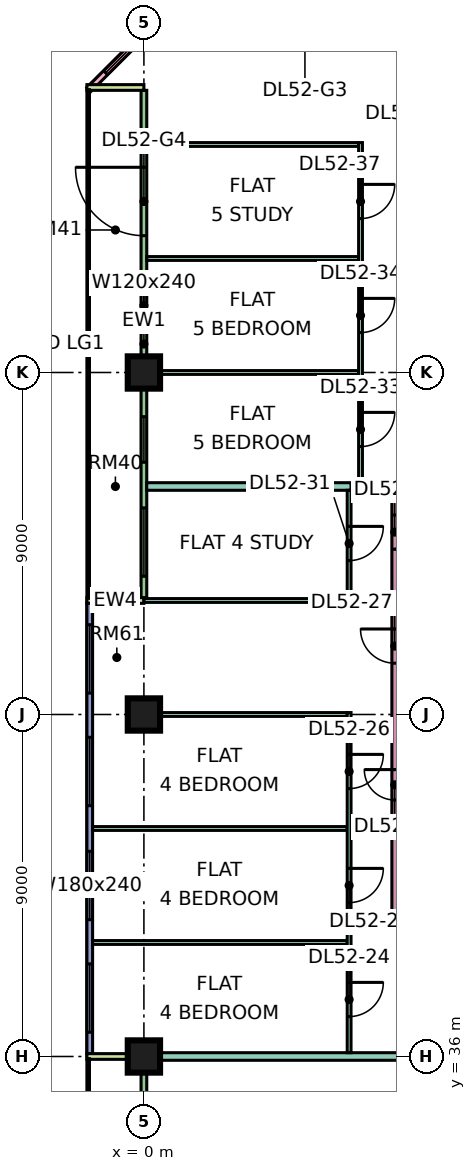
"""IFC4 building model, lengths in metres.
Left out: names, types, materials, properties, quantities, classifications, styles, units other than length and angle.
Written with IfcOpenShell. Run it as: python <this file> out.ifc"""

import sys

from ifc_helpers import new_model, si_unit, direction, frame, frame_2d, origin, origin_2d, place, context, subcontext, project, spatial, rectangle, extrude, element, fill, save


model = new_model("IFC4")
c1 = context("Model", 3, precision=1e-05, world=origin(), true_north=direction((0.0, 1.0)))
c2 = subcontext(c1, "Body", "Model", "MODEL_VIEW")
j1 = project(units=[si_unit("LENGTHUNIT", "METRE"), si_unit("PLANEANGLEUNIT", "RADIAN")], contexts=[c1])
p1 = place(None, origin())
s1 = spatial("IfcSite", under=j1, at=p1, CompositionType="ELEMENT")
p2 = place(p1, origin())
s2 = spatial("IfcBuilding", under=s1, at=p2, CompositionType="ELEMENT")
p3 = place(p2, frame((0.0, 0.0, 222.9)))
s3 = spatial("IfcBuildingStorey", under=s2, at=p3, CompositionType="ELEMENT", Elevation=222.9)
p4 = place(p3, frame((0.0, 36.0, 0.0), z_axis=(0.0, 0.0, 1.0), x_axis=(1.0, 0.0, 0.0)))
e1 = element("IfcColumn", 1, at=p4, inside=s3, PredefinedType="COLUMN", context=c2, shape_type="SweptSolid", body=[
    extrude(rectangle(XDim=0.85, YDim=0.85, at=origin_2d()), origin(), (0.0, 0.0, 1.0), 3.75),
])
p5 = place(p3, frame((0.0, 45.0, 0.0), z_axis=(0.0, 0.0, 1.0), x_axis=(1.0, 0.0, 0.0)))
e2 = element("IfcColumn", 2, at=p5, inside=s3, PredefinedType="COLUMN", context=c2, shape_type="SweptSolid", body=[
    extrude(rectangle(XDim=0.85, YDim=0.85, at=origin_2d()), origin(), (0.0, 0.0, 1.0), 3.75),
])
p6 = place(p3, frame((0.0, 54.0, 0.0), z_axis=(0.0, 0.0, 1.0), x_axis=(1.0, 0.0, 0.0)))
e3 = element("IfcColumn", 3, at=p6, inside=s3, PredefinedType="COLUMN", context=c2, shape_type="SweptSolid", body=[
    extrude(rectangle(XDim=0.85, YDim=0.85, at=origin_2d()), origin(), (0.0, 0.0, 1.0), 3.75),
])
p7 = place(p3, frame((1.553, 64.447, 0.0), z_axis=(0.0, 0.0, 1.0), x_axis=(-0.707106781187, -0.707106781187, 0.0)))
e4 = element("IfcWall", 4, at=p7, inside=s3, PredefinedType="SOLIDWALL", context=c2, shape_type="SweptSolid", body=[
    extrude(rectangle(XDim=4.243, YDim=0.15, at=frame_2d((2.121, 0.0))), origin(), (0.0, 0.0, 1.0), 3.35),
])
p8 = place(p7, frame((0.621, 0.0, 0.45)))
e5 = element("IfcOpeningElement", 5, at=p8, cuts=e4, PredefinedType="OPENING", context=c2, shape_type="SweptSolid", body=[
    extrude(rectangle(XDim=3.0, YDim=2.4, at=frame_2d((1.5, 1.2))), frame((0.0, 0.085, 0.0), z_axis=(0.0, -1.0, 0.0), x_axis=(1.0, 0.0, 0.0)), (0.0, 0.0, 1.0), 0.17),
])
p9 = place(p3, frame((0.0, 61.425, 0.0), z_axis=(0.0, 0.0, 1.0), x_axis=(0.0, -1.0, 0.0)))
e6 = element("IfcWall", 6, at=p9, inside=s3, PredefinedType="SOLIDWALL", context=c2, shape_type="SweptSolid", body=[
    extrude(rectangle(XDim=13.35, YDim=0.15, at=frame_2d((6.675, 0.0))), origin(), (0.0, 0.0, 1.0), 3.35),
])
p10 = place(p9, frame((2.025, 0.0, 0.0)))
e7 = element("IfcOpeningElement", 7, at=p10, cuts=e6, PredefinedType="OPENING", context=c2, shape_type="SweptSolid", body=[
    extrude(rectangle(XDim=1.8, YDim=2.4, at=frame_2d((0.9, 1.2))), frame((0.0, 0.085, 0.0), z_axis=(0.0, -1.0, 0.0), x_axis=(1.0, 0.0, 0.0)), (0.0, 0.0, 1.0), 0.17),
])
p11 = place(p9, frame((5.062, 0.0, 0.45)))
e8 = element("IfcOpeningElement", 8, at=p11, cuts=e6, PredefinedType="OPENING", context=c2, shape_type="SweptSolid", body=[
    extrude(rectangle(XDim=1.2, YDim=2.4, at=frame_2d((0.6, 1.2))), frame((0.0, 0.085, 0.0), z_axis=(0.0, -1.0, 0.0), x_axis=(1.0, 0.0, 0.0)), (0.0, 0.0, 1.0), 0.17),
])
p12 = place(p9, frame((8.587, 0.0, 0.45)))
e9 = element("IfcOpeningElement", 9, at=p12, cuts=e6, PredefinedType="OPENING", context=c2, shape_type="SweptSolid", body=[
    extrude(rectangle(XDim=1.2, YDim=2.4, at=frame_2d((0.6, 1.2))), frame((0.0, 0.085, 0.0), z_axis=(0.0, -1.0, 0.0), x_axis=(1.0, 0.0, 0.0)), (0.0, 0.0, 1.0), 0.17),
])
p13 = place(p9, frame((10.988, 0.0, 0.45)))
e10 = element("IfcOpeningElement", 10, at=p13, cuts=e6, PredefinedType="OPENING", context=c2, shape_type="SweptSolid", body=[
    extrude(rectangle(XDim=1.8, YDim=2.4, at=frame_2d((0.9, 1.2))), frame((0.0, 0.085, 0.0), z_axis=(0.0, -1.0, 0.0), x_axis=(1.0, 0.0, 0.0)), (0.0, 0.0, 1.0), 0.17),
])
for number, where, z_axis, x_axis in (
    (11, (-1.5, 61.5, 0.0), (0.0, 0.0, 1.0), (1.0, 0.0, 0.0)),
    (12, (-1.5, 48.0, 0.0), (0.0, 0.0, 1.0), (1.0, 0.0, 0.0)),
):
    element("IfcWall", number, at=place(p3, frame(where, z_axis=z_axis, x_axis=x_axis)), inside=s3, PredefinedType="SOLIDWALL", context=c2, shape_type="SweptSolid", body=[
        extrude(rectangle(XDim=1.5, YDim=0.15, at=frame_2d((0.75, 0.0))), origin(), (0.0, 0.0, 1.0), 3.35),
    ])
p14 = place(p3, frame((-1.425, 47.925, 0.0), z_axis=(0.0, 0.0, 1.0), x_axis=(0.0, -1.0, 0.0)))
e13 = element("IfcWall", 13, at=p14, inside=s3, PredefinedType="SOLIDWALL", context=c2, shape_type="SweptSolid", body=[
    extrude(rectangle(XDim=11.85, YDim=0.15, at=frame_2d((5.925, 0.0))), origin(), (0.0, 0.0, 1.0), 3.35),
])
p15 = place(p14, frame((0.562, 0.0, 0.45)))
e14 = element("IfcOpeningElement", 14, at=p15, cuts=e13, PredefinedType="OPENING", context=c2, shape_type="SweptSolid", body=[
    extrude(rectangle(XDim=1.8, YDim=2.4, at=frame_2d((0.9, 1.2))), frame((0.0, 0.085, 0.0), z_axis=(0.0, -1.0, 0.0), x_axis=(1.0, 0.0, 0.0)), (0.0, 0.0, 1.0), 0.17),
])
p16 = place(p14, frame((3.525, 0.0, 0.45)))
e15 = element("IfcOpeningElement", 15, at=p16, cuts=e13, PredefinedType="OPENING", context=c2, shape_type="SweptSolid", body=[
    extrude(rectangle(XDim=1.8, YDim=2.4, at=frame_2d((0.9, 1.2))), frame((0.0, 0.085, 0.0), z_axis=(0.0, -1.0, 0.0), x_axis=(1.0, 0.0, 0.0)), (0.0, 0.0, 1.0), 0.17),
])
p17 = place(p14, frame((6.525, 0.0, 0.45)))
e16 = element("IfcOpeningElement", 16, at=p17, cuts=e13, PredefinedType="OPENING", context=c2, shape_type="SweptSolid", body=[
    extrude(rectangle(XDim=1.8, YDim=2.4, at=frame_2d((0.9, 1.2))), frame((0.0, 0.085, 0.0), z_axis=(0.0, -1.0, 0.0), x_axis=(1.0, 0.0, 0.0)), (0.0, 0.0, 1.0), 0.17),
])
p18 = place(p14, frame((9.488, 0.0, 0.45)))
e17 = element("IfcOpeningElement", 17, at=p18, cuts=e13, PredefinedType="OPENING", context=c2, shape_type="SweptSolid", body=[
    extrude(rectangle(XDim=1.8, YDim=2.4, at=frame_2d((0.9, 1.2))), frame((0.0, 0.085, 0.0), z_axis=(0.0, -1.0, 0.0), x_axis=(1.0, 0.0, 0.0)), (0.0, 0.0, 1.0), 0.17),
])
p19 = place(p3, frame((0.0, 35.925, 0.0), z_axis=(0.0, 0.0, 1.0), x_axis=(0.0, -1.0, 0.0)))
e18 = element("IfcWall", 18, at=p19, inside=s3, PredefinedType="SOLIDWALL", context=c2, shape_type="SweptSolid", body=[
    extrude(rectangle(XDim=11.85, YDim=0.15, at=frame_2d((5.925, 0.0))), origin(), (0.0, 0.0, 1.0), 3.35),
])
p20 = place(p19, frame((2.288, 0.0, 0.0)))
e19 = element("IfcOpeningElement", 19, at=p20, cuts=e18, PredefinedType="OPENING", context=c2, shape_type="SweptSolid", body=[
    extrude(rectangle(XDim=1.8, YDim=2.4, at=frame_2d((0.9, 1.2))), frame((0.0, 0.085, 0.0), z_axis=(0.0, -1.0, 0.0), x_axis=(1.0, 0.0, 0.0)), (0.0, 0.0, 1.0), 0.17),
])
p21 = place(p19, frame((6.525, 0.0, 0.45)))
e20 = element("IfcOpeningElement", 20, at=p21, cuts=e18, PredefinedType="OPENING", context=c2, shape_type="SweptSolid", body=[
    extrude(rectangle(XDim=1.8, YDim=2.4, at=frame_2d((0.9, 1.2))), frame((0.0, 0.085, 0.0), z_axis=(0.0, -1.0, 0.0), x_axis=(1.0, 0.0, 0.0)), (0.0, 0.0, 1.0), 0.17),
])
p22 = place(p19, frame((9.562, 0.0, 0.45)))
e21 = element("IfcOpeningElement", 21, at=p22, cuts=e18, PredefinedType="OPENING", context=c2, shape_type="SweptSolid", body=[
    extrude(rectangle(XDim=1.2, YDim=2.4, at=frame_2d((0.6, 1.2))), frame((0.0, 0.085, 0.0), z_axis=(0.0, -1.0, 0.0), x_axis=(1.0, 0.0, 0.0)), (0.0, 0.0, 1.0), 0.17),
])
p23 = place(p3, frame((-1.5, 36.0, 0.0), z_axis=(0.0, 0.0, 1.0), x_axis=(1.0, 0.0, 0.0)))
e22 = element("IfcWall", 22, at=p23, inside=s3, PredefinedType="SOLIDWALL", context=c2, shape_type="SweptSolid", body=[
    extrude(rectangle(XDim=1.5, YDim=0.15, at=frame_2d((0.75, 0.0))), origin(), (0.0, 0.0, 1.0), 3.35),
])
for number, where, z_axis, x_axis in (
    (23, (-1.351, 39.0, 0.0), (0.0, 0.0, 1.0), (1.0, 0.0, 0.0)),
    (24, (-1.351, 42.0, 0.0), (0.0, 0.0, 1.0), (1.0, 0.0, 0.0)),
):
    element("IfcWall", number, at=place(p3, frame(where, z_axis=z_axis, x_axis=x_axis)), inside=s3, PredefinedType="PARTITIONING", context=c2, shape_type="SweptSolid", body=[
        extrude(rectangle(XDim=6.701, YDim=0.1, at=frame_2d((3.351, 0.0))), origin(), (0.0, 0.0, 1.0), 3.35),
    ])
e25 = element("IfcWall", 25, at=p4, inside=s3, PredefinedType="PARTITIONING", context=c2, shape_type="SweptSolid", body=[
    extrude(rectangle(XDim=9.5, YDim=0.2, at=frame_2d((4.75, 0.0))), origin(), (0.0, 0.0, 1.0), 3.35),
])
e26 = element("IfcWall", 26, at=p5, inside=s3, PredefinedType="PARTITIONING", context=c2, shape_type="SweptSolid", body=[
    extrude(rectangle(XDim=5.35, YDim=0.1, at=frame_2d((2.675, 0.0))), origin(), (0.0, 0.0, 1.0), 3.35),
])
p24 = place(p3, frame((0.0, 48.0, 0.0), z_axis=(0.0, 0.0, 1.0), x_axis=(1.0, 0.0, 0.0)))
e27 = element("IfcWall", 27, at=p24, inside=s3, PredefinedType="PARTITIONING", context=c2, shape_type="SweptSolid", body=[
    extrude(rectangle(XDim=5.45, YDim=0.1, at=frame_2d((2.725, 0.0))), origin(), (0.0, 0.0, 1.0), 3.35),
])
p25 = place(p3, frame((0.074, 51.0, 0.0), z_axis=(0.0, 0.0, 1.0), x_axis=(1.0, 0.0, 0.0)))
e28 = element("IfcWall", 28, at=p25, inside=s3, PredefinedType="PARTITIONING", context=c2, shape_type="SweptSolid", body=[
    extrude(rectangle(XDim=5.376, YDim=0.2, at=frame_2d((2.688, 0.0))), origin(), (0.0, 0.0, 1.0), 3.35),
])
for number, where, z_axis, x_axis in (
    (29, (0.074, 54.0, 0.0), (0.0, 0.0, 1.0), (1.0, 0.0, 0.0)),
    (30, (0.074, 57.0, 0.0), (0.0, 0.0, 1.0), (1.0, 0.0, 0.0)),
    (31, (0.074, 60.0, 0.0), (0.0, 0.0, 1.0), (1.0, 0.0, 0.0)),
):
    element("IfcWall", number, at=place(p3, frame(where, z_axis=z_axis, x_axis=x_axis)), inside=s3, PredefinedType="PARTITIONING", context=c2, shape_type="SweptSolid", body=[
        extrude(rectangle(XDim=5.576, YDim=0.1, at=frame_2d((2.788, 0.0))), origin(), (0.0, 0.0, 1.0), 3.35),
    ])
p26 = place(p3, frame((5.4, 36.1, 0.0), z_axis=(0.0, 0.0, 1.0), x_axis=(0.0, 1.0, 0.0)))
e32 = element("IfcWall", 32, at=p26, inside=s3, PredefinedType="PARTITIONING", context=c2, shape_type="SweptSolid", body=[
    extrude(rectangle(XDim=8.95, YDim=0.1, at=frame_2d((4.475, 0.0))), origin(), (0.0, 0.0, 1.0), 3.35),
])
p27 = place(p26, frame((0.95, 0.0, 0.0)))
e33 = element("IfcOpeningElement", 33, at=p27, cuts=e32, PredefinedType="OPENING", context=c2, shape_type="SweptSolid", body=[
    extrude(rectangle(XDim=0.9, YDim=2.1, at=frame_2d((0.45, 1.05))), frame((0.0, 0.06, 0.0), z_axis=(0.0, -1.0, 0.0), x_axis=(1.0, 0.0, 0.0)), (0.0, 0.0, 1.0), 0.12),
])
p28 = place(p26, frame((3.95, 0.0, 0.0)))
e34 = element("IfcOpeningElement", 34, at=p28, cuts=e32, PredefinedType="OPENING", context=c2, shape_type="SweptSolid", body=[
    extrude(rectangle(XDim=0.9, YDim=2.1, at=frame_2d((0.45, 1.05))), frame((0.0, 0.06, 0.0), z_axis=(0.0, -1.0, 0.0), x_axis=(1.0, 0.0, 0.0)), (0.0, 0.0, 1.0), 0.12),
])
p29 = place(p26, frame((6.95, 0.0, 0.0)))
e35 = element("IfcOpeningElement", 35, at=p29, cuts=e32, PredefinedType="OPENING", context=c2, shape_type="SweptSolid", body=[
    extrude(rectangle(XDim=0.9, YDim=2.1, at=frame_2d((0.45, 1.05))), frame((0.0, 0.06, 0.0), z_axis=(0.0, -1.0, 0.0), x_axis=(1.0, 0.0, 0.0)), (0.0, 0.0, 1.0), 0.12),
])
p30 = place(p3, frame((5.4, 48.05, 0.0), z_axis=(0.0, 0.0, 1.0), x_axis=(0.0, 1.0, 0.0)))
e36 = element("IfcWall", 36, at=p30, inside=s3, PredefinedType="PARTITIONING", context=c2, shape_type="SweptSolid", body=[
    extrude(rectangle(XDim=2.85, YDim=0.1, at=frame_2d((1.425, 0.0))), origin(), (0.0, 0.0, 1.0), 3.35),
])
p31 = place(p30, frame((1.0, 0.0, 0.0)))
e37 = element("IfcOpeningElement", 37, at=p31, cuts=e36, PredefinedType="OPENING", context=c2, shape_type="SweptSolid", body=[
    extrude(rectangle(XDim=0.9, YDim=2.1, at=frame_2d((0.45, 1.05))), frame((0.0, 0.06, 0.0), z_axis=(0.0, -1.0, 0.0), x_axis=(1.0, 0.0, 0.0)), (0.0, 0.0, 1.0), 0.12),
])
p32 = place(p3, frame((5.65, 51.0, 0.0), z_axis=(0.0, 0.0, 1.0), x_axis=(1.0, 0.0, 0.0)))
e38 = element("IfcWall", 38, at=p32, inside=s3, PredefinedType="PARTITIONING", context=c2, shape_type="SweptSolid", body=[
    extrude(rectangle(XDim=3.85, YDim=0.2, at=frame_2d((1.925, 0.0))), origin(), (0.0, 0.0, 1.0), 3.35),
])
p33 = place(p3, frame((5.7, 51.1, 0.0), z_axis=(0.0, 0.0, 1.0), x_axis=(0.0, 1.0, 0.0)))
e39 = element("IfcWall", 39, at=p33, inside=s3, PredefinedType="PARTITIONING", context=c2, shape_type="SweptSolid", body=[
    extrude(rectangle(XDim=8.95, YDim=0.1, at=frame_2d((4.475, 0.0))), origin(), (0.0, 0.0, 1.0), 3.35),
])
p34 = place(p33, frame((0.95, 0.0, 0.0)))
e40 = element("IfcOpeningElement", 40, at=p34, cuts=e39, PredefinedType="OPENING", context=c2, shape_type="SweptSolid", body=[
    extrude(rectangle(XDim=0.9, YDim=2.1, at=frame_2d((0.45, 1.05))), frame((0.0, 0.06, 0.0), z_axis=(0.0, -1.0, 0.0), x_axis=(1.0, 0.0, 0.0)), (0.0, 0.0, 1.0), 0.12),
])
p35 = place(p33, frame((3.95, 0.0, 0.0)))
e41 = element("IfcOpeningElement", 41, at=p35, cuts=e39, PredefinedType="OPENING", context=c2, shape_type="SweptSolid", body=[
    extrude(rectangle(XDim=0.9, YDim=2.1, at=frame_2d((0.45, 1.05))), frame((0.0, 0.06, 0.0), z_axis=(0.0, -1.0, 0.0), x_axis=(1.0, 0.0, 0.0)), (0.0, 0.0, 1.0), 0.12),
])
p36 = place(p33, frame((6.95, 0.0, 0.0)))
e42 = element("IfcOpeningElement", 42, at=p36, cuts=e39, PredefinedType="OPENING", context=c2, shape_type="SweptSolid", body=[
    extrude(rectangle(XDim=0.9, YDim=2.1, at=frame_2d((0.45, 1.05))), frame((0.0, 0.06, 0.0), z_axis=(0.0, -1.0, 0.0), x_axis=(1.0, 0.0, 0.0)), (0.0, 0.0, 1.0), 0.12),
])
p37 = place(p3, frame((6.6, 39.25, 0.0), z_axis=(0.0, 0.0, 1.0), x_axis=(0.0, 1.0, 0.0)))
e43 = element("IfcWall", 43, at=p37, inside=s3, PredefinedType="PARTITIONING", context=c2, shape_type="SweptSolid", body=[
    extrude(rectangle(XDim=11.65, YDim=0.15, at=frame_2d((5.825, 0.0))), origin(), (0.0, 0.0, 1.0), 3.35),
])
p38 = place(p37, frame((3.5, 0.0, 0.0)))
e44 = element("IfcOpeningElement", 44, at=p38, cuts=e43, PredefinedType="OPENING", context=c2, shape_type="SweptSolid", body=[
    extrude(rectangle(XDim=0.8, YDim=2.1, at=frame_2d((0.4, 1.05))), frame((0.0, 0.085, 0.0), z_axis=(0.0, -1.0, 0.0), x_axis=(1.0, 0.0, 0.0)), (0.0, 0.0, 1.0), 0.17),
])
p39 = place(p37, frame((7.1, 0.0, 0.0)))
e45 = element("IfcOpeningElement", 45, at=p39, cuts=e43, PredefinedType="OPENING", context=c2, shape_type="SweptSolid", body=[
    extrude(rectangle(XDim=0.9, YDim=2.1, at=frame_2d((0.45, 1.05))), frame((0.0, 0.085, 0.0), z_axis=(0.0, -1.0, 0.0), x_axis=(1.0, 0.0, 0.0)), (0.0, 0.0, 1.0), 0.17),
])
p40 = place(p37, frame((10.1, 0.0, 0.0)))
e46 = element("IfcOpeningElement", 46, at=p40, cuts=e43, PredefinedType="OPENING", context=c2, shape_type="SweptSolid", body=[
    extrude(rectangle(XDim=0.9, YDim=2.1, at=frame_2d((0.45, 1.05))), frame((0.0, 0.085, 0.0), z_axis=(0.0, -1.0, 0.0), x_axis=(1.0, 0.0, 0.0)), (0.0, 0.0, 1.0), 0.17),
])
p41 = place(p8, origin())
e47 = element("IfcWindow", 47, at=p41, inside=s3, PartitioningType="SINGLE_PANEL", PredefinedType="WINDOW", context=c2, shape_type="SweptSolid", body=[
    extrude(rectangle(XDim=3.0, YDim=2.4, at=frame_2d((1.5, 1.2))), frame((0.0, 0.03, 0.0), z_axis=(0.0, -1.0, 0.0), x_axis=(1.0, 0.0, 0.0)), (0.0, 0.0, 1.0), 0.06),
])
fill(e5, e47)
p42 = place(p10, frame((1.8, 0.0, 0.0), z_axis=(0.0, 0.0, 1.0), x_axis=(-1.0, 0.0, 0.0)))
e48 = element("IfcDoor", 48, at=p42, inside=s3, OperationType="DOUBLE_DOOR_SINGLE_SWING", PredefinedType="DOOR", context=c2, shape_type="SweptSolid", body=[
    extrude(rectangle(XDim=1.8, YDim=2.4, at=frame_2d((0.9, 1.2))), frame((0.0, 0.025, 0.0), z_axis=(0.0, -1.0, 0.0), x_axis=(1.0, 0.0, 0.0)), (0.0, 0.0, 1.0), 0.05),
])
fill(e7, e48)
p43 = place(p11, origin())
e49 = element("IfcWindow", 49, at=p43, inside=s3, PartitioningType="SINGLE_PANEL", PredefinedType="WINDOW", context=c2, shape_type="SweptSolid", body=[
    extrude(rectangle(XDim=1.2, YDim=2.4, at=frame_2d((0.6, 1.2))), frame((0.0, 0.03, 0.0), z_axis=(0.0, -1.0, 0.0), x_axis=(1.0, 0.0, 0.0)), (0.0, 0.0, 1.0), 0.06),
])
fill(e8, e49)
p44 = place(p12, origin())
e50 = element("IfcWindow", 50, at=p44, inside=s3, PartitioningType="SINGLE_PANEL", PredefinedType="WINDOW", context=c2, shape_type="SweptSolid", body=[
    extrude(rectangle(XDim=1.2, YDim=2.4, at=frame_2d((0.6, 1.2))), frame((0.0, 0.03, 0.0), z_axis=(0.0, -1.0, 0.0), x_axis=(1.0, 0.0, 0.0)), (0.0, 0.0, 1.0), 0.06),
])
fill(e9, e50)
p45 = place(p13, origin())
e51 = element("IfcWindow", 51, at=p45, inside=s3, PartitioningType="SINGLE_PANEL", PredefinedType="WINDOW", context=c2, shape_type="SweptSolid", body=[
    extrude(rectangle(XDim=1.8, YDim=2.4, at=frame_2d((0.9, 1.2))), frame((0.0, 0.03, 0.0), z_axis=(0.0, -1.0, 0.0), x_axis=(1.0, 0.0, 0.0)), (0.0, 0.0, 1.0), 0.06),
])
fill(e10, e51)
p46 = place(p15, origin())
e52 = element("IfcWindow", 52, at=p46, inside=s3, PartitioningType="SINGLE_PANEL", PredefinedType="WINDOW", context=c2, shape_type="SweptSolid", body=[
    extrude(rectangle(XDim=1.8, YDim=2.4, at=frame_2d((0.9, 1.2))), frame((0.0, 0.03, 0.0), z_axis=(0.0, -1.0, 0.0), x_axis=(1.0, 0.0, 0.0)), (0.0, 0.0, 1.0), 0.06),
])
fill(e14, e52)
p47 = place(p16, origin())
e53 = element("IfcWindow", 53, at=p47, inside=s3, PartitioningType="SINGLE_PANEL", PredefinedType="WINDOW", context=c2, shape_type="SweptSolid", body=[
    extrude(rectangle(XDim=1.8, YDim=2.4, at=frame_2d((0.9, 1.2))), frame((0.0, 0.03, 0.0), z_axis=(0.0, -1.0, 0.0), x_axis=(1.0, 0.0, 0.0)), (0.0, 0.0, 1.0), 0.06),
])
fill(e15, e53)
p48 = place(p17, origin())
e54 = element("IfcWindow", 54, at=p48, inside=s3, PartitioningType="SINGLE_PANEL", PredefinedType="WINDOW", context=c2, shape_type="SweptSolid", body=[
    extrude(rectangle(XDim=1.8, YDim=2.4, at=frame_2d((0.9, 1.2))), frame((0.0, 0.03, 0.0), z_axis=(0.0, -1.0, 0.0), x_axis=(1.0, 0.0, 0.0)), (0.0, 0.0, 1.0), 0.06),
])
fill(e16, e54)
p49 = place(p18, origin())
e55 = element("IfcWindow", 55, at=p49, inside=s3, PartitioningType="SINGLE_PANEL", PredefinedType="WINDOW", context=c2, shape_type="SweptSolid", body=[
    extrude(rectangle(XDim=1.8, YDim=2.4, at=frame_2d((0.9, 1.2))), frame((0.0, 0.03, 0.0), z_axis=(0.0, -1.0, 0.0), x_axis=(1.0, 0.0, 0.0)), (0.0, 0.0, 1.0), 0.06),
])
fill(e17, e55)
p50 = place(p38, frame((0.8, 0.0, 0.0), z_axis=(0.0, 0.0, 1.0), x_axis=(-1.0, 0.0, 0.0)))
e56 = element("IfcDoor", 56, at=p50, inside=s3, OperationType="SINGLE_SWING_RIGHT", PredefinedType="DOOR", context=c2, shape_type="SweptSolid", body=[
    extrude(rectangle(XDim=0.8, YDim=2.1, at=frame_2d((0.4, 1.05))), frame((0.0, 0.025, 0.0), z_axis=(0.0, -1.0, 0.0), x_axis=(1.0, 0.0, 0.0)), (0.0, 0.0, 1.0), 0.05),
])
fill(e44, e56)
p51 = place(p27, origin())
e57 = element("IfcDoor", 57, at=p51, inside=s3, OperationType="SINGLE_SWING_RIGHT", PredefinedType="DOOR", context=c2, shape_type="SweptSolid", body=[
    extrude(rectangle(XDim=0.9, YDim=2.1, at=frame_2d((0.45, 1.05))), frame((0.0, 0.025, 0.0), z_axis=(0.0, -1.0, 0.0), x_axis=(1.0, 0.0, 0.0)), (0.0, 0.0, 1.0), 0.05),
])
fill(e33, e57)
p52 = place(p28, origin())
e58 = element("IfcDoor", 58, at=p52, inside=s3, OperationType="SINGLE_SWING_RIGHT", PredefinedType="DOOR", context=c2, shape_type="SweptSolid", body=[
    extrude(rectangle(XDim=0.9, YDim=2.1, at=frame_2d((0.45, 1.05))), frame((0.0, 0.025, 0.0), z_axis=(0.0, -1.0, 0.0), x_axis=(1.0, 0.0, 0.0)), (0.0, 0.0, 1.0), 0.05),
])
fill(e34, e58)
p53 = place(p29, origin())
e59 = element("IfcDoor", 59, at=p53, inside=s3, OperationType="SINGLE_SWING_RIGHT", PredefinedType="DOOR", context=c2, shape_type="SweptSolid", body=[
    extrude(rectangle(XDim=0.9, YDim=2.1, at=frame_2d((0.45, 1.05))), frame((0.0, 0.025, 0.0), z_axis=(0.0, -1.0, 0.0), x_axis=(1.0, 0.0, 0.0)), (0.0, 0.0, 1.0), 0.05),
])
fill(e35, e59)
p54 = place(p39, frame((0.9, 0.0, 0.0), z_axis=(0.0, 0.0, 1.0), x_axis=(-1.0, 0.0, 0.0)))
e60 = element("IfcDoor", 60, at=p54, inside=s3, OperationType="SINGLE_SWING_RIGHT", PredefinedType="DOOR", context=c2, shape_type="SweptSolid", body=[
    extrude(rectangle(XDim=0.9, YDim=2.1, at=frame_2d((0.45, 1.05))), frame((0.0, 0.025, 0.0), z_axis=(0.0, -1.0, 0.0), x_axis=(1.0, 0.0, 0.0)), (0.0, 0.0, 1.0), 0.05),
])
fill(e45, e60)
p55 = place(p40, frame((0.9, 0.0, 0.0), z_axis=(0.0, 0.0, 1.0), x_axis=(-1.0, 0.0, 0.0)))
e61 = element("IfcDoor", 61, at=p55, inside=s3, OperationType="SINGLE_SWING_LEFT", PredefinedType="DOOR", context=c2, shape_type="SweptSolid", body=[
    extrude(rectangle(XDim=0.9, YDim=2.1, at=frame_2d((0.45, 1.05))), frame((0.0, 0.025, 0.0), z_axis=(0.0, -1.0, 0.0), x_axis=(1.0, 0.0, 0.0)), (0.0, 0.0, 1.0), 0.05),
])
fill(e46, e61)
p56 = place(p31, origin())
e62 = element("IfcDoor", 62, at=p56, inside=s3, OperationType="SINGLE_SWING_RIGHT", PredefinedType="DOOR", context=c2, shape_type="SweptSolid", body=[
    extrude(rectangle(XDim=0.9, YDim=2.1, at=frame_2d((0.45, 1.05))), frame((0.0, 0.025, 0.0), z_axis=(0.0, -1.0, 0.0), x_axis=(1.0, 0.0, 0.0)), (0.0, 0.0, 1.0), 0.05),
])
fill(e37, e62)
p57 = place(p34, origin())
e63 = element("IfcDoor", 63, at=p57, inside=s3, OperationType="SINGLE_SWING_RIGHT", PredefinedType="DOOR", context=c2, shape_type="SweptSolid", body=[
    extrude(rectangle(XDim=0.9, YDim=2.1, at=frame_2d((0.45, 1.05))), frame((0.0, 0.025, 0.0), z_axis=(0.0, -1.0, 0.0), x_axis=(1.0, 0.0, 0.0)), (0.0, 0.0, 1.0), 0.05),
])
fill(e40, e63)
p58 = place(p35, origin())
e64 = element("IfcDoor", 64, at=p58, inside=s3, OperationType="SINGLE_SWING_RIGHT", PredefinedType="DOOR", context=c2, shape_type="SweptSolid", body=[
    extrude(rectangle(XDim=0.9, YDim=2.1, at=frame_2d((0.45, 1.05))), frame((0.0, 0.025, 0.0), z_axis=(0.0, -1.0, 0.0), x_axis=(1.0, 0.0, 0.0)), (0.0, 0.0, 1.0), 0.05),
])
fill(e41, e64)
p59 = place(p36, origin())
e65 = element("IfcDoor", 65, at=p59, inside=s3, OperationType="SINGLE_SWING_RIGHT", PredefinedType="DOOR", context=c2, shape_type="SweptSolid", body=[
    extrude(rectangle(XDim=0.9, YDim=2.1, at=frame_2d((0.45, 1.05))), frame((0.0, 0.025, 0.0), z_axis=(0.0, -1.0, 0.0), x_axis=(1.0, 0.0, 0.0)), (0.0, 0.0, 1.0), 0.05),
])
fill(e42, e65)
save(model, sys.argv[1])
